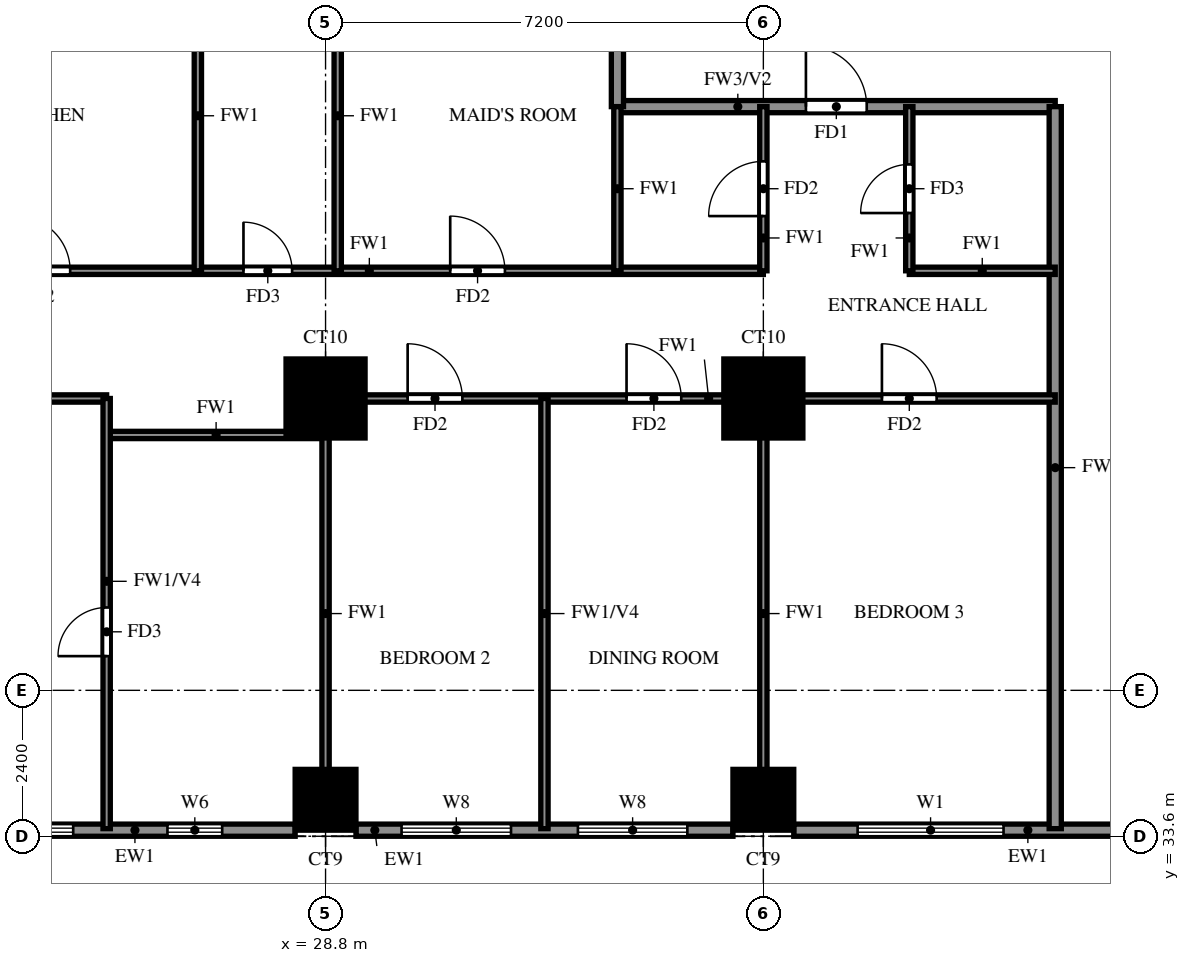
"""IFC4 building model, lengths in metres.
Left out: names, types, materials, properties, quantities, classifications, styles, units other than length and angle.
Written with IfcOpenShell. Run it as: python <this file> out.ifc"""

import sys

from ifc_helpers import new_model, si_unit, direction, frame, frame_2d, origin, origin_2d, place, context, subcontext, project, spatial, rectangle, extrude, source, transform, mapped, element, fill, save


model = new_model("IFC4")
c1 = context("Model", 3, precision=1e-05, world=origin(), true_north=direction((0.0, 1.0)))
c2 = subcontext(c1, "Body", "Model", "MODEL_VIEW")
j1 = project(units=[si_unit("LENGTHUNIT", "METRE"), si_unit("PLANEANGLEUNIT", "RADIAN")], contexts=[c1])
p1 = place(None, origin())
s1 = spatial("IfcSite", under=j1, at=p1, CompositionType="ELEMENT")
p2 = place(p1, origin())
s2 = spatial("IfcBuilding", under=s1, at=p2, CompositionType="ELEMENT")
p3 = place(p2, frame((0.0, 0.0, 90.0)))
s3 = spatial("IfcBuildingStorey", under=s2, at=p3, CompositionType="ELEMENT", Elevation=90.0)
m1 = source(origin(), c2, "Body", "SweptSolid", [
    extrude(rectangle(XDim=1.0, YDim=1.0, at=origin_2d()), origin(), (0.0, 0.0, 1.0), 3.18),
])
for number, where, z_axis, x_axis in (
    (1, (28.8, 34.2, 0.0), (0.0, 0.0, 1.0), (1.0, 0.0, 0.0)),
    (2, (36.0, 34.2, 0.0), (0.0, 0.0, 1.0), (1.0, 0.0, 0.0)),
):
    element("IfcColumn", number, at=place(p3, frame(where, z_axis=z_axis, x_axis=x_axis)), inside=s3, PredefinedType="COLUMN", context=c2, shape_type="MappedRepresentation", body=[
        mapped(m1, transform((0.0, 0.0, 0.0))),
    ])
m2 = source(origin(), c2, "Body", "SweptSolid", [
    extrude(rectangle(XDim=1.3, YDim=1.3, at=origin_2d()), origin(), (0.0, 0.0, 1.0), 3.18),
])
for number, where, z_axis, x_axis in (
    (3, (28.8, 40.8, 0.0), (0.0, 0.0, 1.0), (1.0, 0.0, 0.0)),
    (4, (36.0, 40.8, 0.0), (0.0, 0.0, 1.0), (1.0, 0.0, 0.0)),
):
    element("IfcColumn", number, at=place(p3, frame(where, z_axis=z_axis, x_axis=x_axis)), inside=s3, PredefinedType="COLUMN", context=c2, shape_type="MappedRepresentation", body=[
        mapped(m2, transform((0.0, 0.0, 0.0))),
    ])
p4 = place(p3, frame((22.1, 33.7, 0.0), z_axis=(0.0, 0.0, 1.0), x_axis=(1.0, 0.0, 0.0)))
e5 = element("IfcWall", 5, at=p4, inside=s3, PredefinedType="SOLIDWALL", context=c2, shape_type="SweptSolid", body=[
    extrude(rectangle(XDim=6.2, YDim=0.2, at=frame_2d((3.1, 0.0))), origin(), (0.0, 0.0, 1.0), 3.18),
])
p5 = place(p4, frame((0.75, 0.0, 0.6)))
e6 = element("IfcOpeningElement", 6, at=p5, cuts=e5, PredefinedType="OPENING", context=c2, shape_type="SweptSolid", body=[
    extrude(rectangle(XDim=1.8, YDim=2.4, at=frame_2d((0.9, 1.2))), frame((0.0, 0.11, 0.0), z_axis=(0.0, -1.0, 0.0), x_axis=(1.0, 0.0, 0.0)), (0.0, 0.0, 1.0), 0.22),
])
p6 = place(p4, frame((4.1, 0.0, 1.5)))
e7 = element("IfcOpeningElement", 7, at=p6, cuts=e5, PredefinedType="OPENING", context=c2, shape_type="SweptSolid", body=[
    extrude(rectangle(XDim=0.9, YDim=0.9, at=frame_2d((0.45, 0.45))), frame((0.0, 0.11, 0.0), z_axis=(0.0, -1.0, 0.0), x_axis=(1.0, 0.0, 0.0)), (0.0, 0.0, 1.0), 0.22),
])
p7 = place(p3, frame((29.3, 33.7, 0.0), z_axis=(0.0, 0.0, 1.0), x_axis=(1.0, 0.0, 0.0)))
e8 = element("IfcWall", 8, at=p7, inside=s3, PredefinedType="SOLIDWALL", context=c2, shape_type="SweptSolid", body=[
    extrude(rectangle(XDim=6.2, YDim=0.2, at=frame_2d((3.1, 0.0))), origin(), (0.0, 0.0, 1.0), 3.18),
])
p8 = place(p7, frame((0.75, 0.0, 0.6)))
e9 = element("IfcOpeningElement", 9, at=p8, cuts=e8, PredefinedType="OPENING", context=c2, shape_type="SweptSolid", body=[
    extrude(rectangle(XDim=1.8, YDim=2.4, at=frame_2d((0.9, 1.2))), frame((0.0, 0.11, 0.0), z_axis=(0.0, -1.0, 0.0), x_axis=(1.0, 0.0, 0.0)), (0.0, 0.0, 1.0), 0.22),
])
p9 = place(p7, frame((3.65, 0.0, 0.6)))
e10 = element("IfcOpeningElement", 10, at=p9, cuts=e8, PredefinedType="OPENING", context=c2, shape_type="SweptSolid", body=[
    extrude(rectangle(XDim=1.8, YDim=2.4, at=frame_2d((0.9, 1.2))), frame((0.0, 0.11, 0.0), z_axis=(0.0, -1.0, 0.0), x_axis=(1.0, 0.0, 0.0)), (0.0, 0.0, 1.0), 0.22),
])
p10 = place(p3, frame((36.5, 33.7, 0.0), z_axis=(0.0, 0.0, 1.0), x_axis=(1.0, 0.0, 0.0)))
e11 = element("IfcWall", 11, at=p10, inside=s3, PredefinedType="SOLIDWALL", context=c2, shape_type="SweptSolid", body=[
    extrude(rectangle(XDim=5.5, YDim=0.2, at=frame_2d((2.75, 0.0))), origin(), (0.0, 0.0, 1.0), 3.18),
])
p11 = place(p10, frame((1.05, 0.0, 0.6)))
e12 = element("IfcOpeningElement", 12, at=p11, cuts=e11, PredefinedType="OPENING", context=c2, shape_type="SweptSolid", body=[
    extrude(rectangle(XDim=2.4, YDim=2.4, at=frame_2d((1.2, 1.2))), frame((0.0, 0.11, 0.0), z_axis=(0.0, -1.0, 0.0), x_axis=(1.0, 0.0, 0.0)), (0.0, 0.0, 1.0), 0.22),
])
p12 = place(p3, frame((33.6, 45.6, 0.0), z_axis=(0.0, 0.0, 1.0), x_axis=(1.0, 0.0, 0.0)))
e13 = element("IfcWall", 13, at=p12, inside=s3, PredefinedType="SOLIDWALL", context=c2, shape_type="SweptSolid", body=[
    extrude(rectangle(XDim=7.2, YDim=0.2, at=frame_2d((3.6, 0.0))), origin(), (0.0, 0.0, 1.0), 3.18),
])
p13 = place(p12, frame((3.1, 0.0, 0.0)))
e14 = element("IfcOpeningElement", 14, at=p13, cuts=e13, PredefinedType="OPENING", context=c2, shape_type="SweptSolid", body=[
    extrude(rectangle(XDim=1.0, YDim=2.1, at=frame_2d((0.5, 1.05))), frame((0.0, 0.11, 0.0), z_axis=(0.0, -1.0, 0.0), x_axis=(1.0, 0.0, 0.0)), (0.0, 0.0, 1.0), 0.22),
])
p14 = place(p3, frame((33.6, 45.6, 0.0), z_axis=(0.0, 0.0, 1.0), x_axis=(0.0, 1.0, 0.0)))
e15 = element("IfcWall", 15, at=p14, inside=s3, PredefinedType="SOLIDWALL", context=c2, shape_type="SweptSolid", body=[
    extrude(rectangle(XDim=12.0, YDim=0.2, at=frame_2d((6.0, 0.0))), origin(), (0.0, 0.0, 1.0), 3.18),
])
p15 = place(p3, frame((40.8, 33.725, 0.0), z_axis=(0.0, 0.0, 1.0), x_axis=(0.0, 1.0, 0.0)))
e16 = element("IfcWall", 16, at=p15, inside=s3, PredefinedType="SOLIDWALL", context=c2, shape_type="SweptSolid", body=[
    extrude(rectangle(XDim=11.875, YDim=0.2, at=frame_2d((5.938, 0.0))), origin(), (0.0, 0.0, 1.0), 2.28),
])
p16 = place(p3, frame((25.2, 40.2, 0.0), z_axis=(0.0, 0.0, 1.0), x_axis=(1.0, 0.0, 0.0)))
e17 = element("IfcWall", 17, at=p16, inside=s3, PredefinedType="PARTITIONING", context=c2, shape_type="SweptSolid", body=[
    extrude(rectangle(XDim=3.6, YDim=0.12, at=frame_2d((1.8, 0.0))), origin(), (0.0, 0.0, 1.0), 3.18),
])
p17 = place(p3, frame((21.6, 40.8, 0.0), z_axis=(0.0, 0.0, 1.0), x_axis=(1.0, 0.0, 0.0)))
e18 = element("IfcWall", 18, at=p17, inside=s3, PredefinedType="PARTITIONING", context=c2, shape_type="SweptSolid", body=[
    extrude(rectangle(XDim=3.6, YDim=0.12, at=frame_2d((1.8, 0.0))), origin(), (0.0, 0.0, 1.0), 3.18),
])
p18 = place(p17, frame((1.35, 0.0, 0.0)))
e19 = element("IfcOpeningElement", 19, at=p18, cuts=e18, PredefinedType="OPENING", context=c2, shape_type="SweptSolid", body=[
    extrude(rectangle(XDim=0.9, YDim=2.1, at=frame_2d((0.45, 1.05))), frame((0.0, 0.07, 0.0), z_axis=(0.0, -1.0, 0.0), x_axis=(1.0, 0.0, 0.0)), (0.0, 0.0, 1.0), 0.14),
])
p19 = place(p3, frame((28.8, 40.8, 0.0), z_axis=(0.0, 0.0, 1.0), x_axis=(1.0, 0.0, 0.0)))
e20 = element("IfcWall", 20, at=p19, inside=s3, PredefinedType="PARTITIONING", context=c2, shape_type="SweptSolid", body=[
    extrude(rectangle(XDim=12.0, YDim=0.12, at=frame_2d((6.0, 0.0))), origin(), (0.0, 0.0, 1.0), 3.18),
])
p20 = place(p19, frame((1.35, 0.0, 0.0)))
e21 = element("IfcOpeningElement", 21, at=p20, cuts=e20, PredefinedType="OPENING", context=c2, shape_type="SweptSolid", body=[
    extrude(rectangle(XDim=0.9, YDim=2.1, at=frame_2d((0.45, 1.05))), frame((0.0, 0.07, 0.0), z_axis=(0.0, -1.0, 0.0), x_axis=(1.0, 0.0, 0.0)), (0.0, 0.0, 1.0), 0.14),
])
p21 = place(p19, frame((4.95, 0.0, 0.0)))
e22 = element("IfcOpeningElement", 22, at=p21, cuts=e20, PredefinedType="OPENING", context=c2, shape_type="SweptSolid", body=[
    extrude(rectangle(XDim=0.9, YDim=2.1, at=frame_2d((0.45, 1.05))), frame((0.0, 0.07, 0.0), z_axis=(0.0, -1.0, 0.0), x_axis=(1.0, 0.0, 0.0)), (0.0, 0.0, 1.0), 0.14),
])
p22 = place(p19, frame((9.15, 0.0, 0.0)))
e23 = element("IfcOpeningElement", 23, at=p22, cuts=e20, PredefinedType="OPENING", context=c2, shape_type="SweptSolid", body=[
    extrude(rectangle(XDim=0.9, YDim=2.1, at=frame_2d((0.45, 1.05))), frame((0.0, 0.07, 0.0), z_axis=(0.0, -1.0, 0.0), x_axis=(1.0, 0.0, 0.0)), (0.0, 0.0, 1.0), 0.14),
])
p23 = place(p3, frame((21.6, 42.9, 0.0), z_axis=(0.0, 0.0, 1.0), x_axis=(1.0, 0.0, 0.0)))
e24 = element("IfcWall", 24, at=p23, inside=s3, PredefinedType="PARTITIONING", context=c2, shape_type="SweptSolid", body=[
    extrude(rectangle(XDim=14.4, YDim=0.12, at=frame_2d((7.2, 0.0))), origin(), (0.0, 0.0, 1.0), 3.18),
])
p24 = place(p23, frame((2.1, 0.0, 0.0)))
e25 = element("IfcOpeningElement", 25, at=p24, cuts=e24, PredefinedType="OPENING", context=c2, shape_type="SweptSolid", body=[
    extrude(rectangle(XDim=0.9, YDim=2.1, at=frame_2d((0.45, 1.05))), frame((0.0, 0.07, 0.0), z_axis=(0.0, -1.0, 0.0), x_axis=(1.0, 0.0, 0.0)), (0.0, 0.0, 1.0), 0.14),
])
p25 = place(p23, frame((5.85, 0.0, 0.0)))
e26 = element("IfcOpeningElement", 26, at=p25, cuts=e24, PredefinedType="OPENING", context=c2, shape_type="SweptSolid", body=[
    extrude(rectangle(XDim=0.8, YDim=2.1, at=frame_2d((0.4, 1.05))), frame((0.0, 0.07, 0.0), z_axis=(0.0, -1.0, 0.0), x_axis=(1.0, 0.0, 0.0)), (0.0, 0.0, 1.0), 0.14),
])
p26 = place(p23, frame((9.25, 0.0, 0.0)))
e27 = element("IfcOpeningElement", 27, at=p26, cuts=e24, PredefinedType="OPENING", context=c2, shape_type="SweptSolid", body=[
    extrude(rectangle(XDim=0.9, YDim=2.1, at=frame_2d((0.45, 1.05))), frame((0.0, 0.07, 0.0), z_axis=(0.0, -1.0, 0.0), x_axis=(1.0, 0.0, 0.0)), (0.0, 0.0, 1.0), 0.14),
])
p27 = place(p3, frame((38.4, 42.9, 0.0), z_axis=(0.0, 0.0, 1.0), x_axis=(1.0, 0.0, 0.0)))
e28 = element("IfcWall", 28, at=p27, inside=s3, PredefinedType="PARTITIONING", context=c2, shape_type="SweptSolid", body=[
    extrude(rectangle(XDim=2.4, YDim=0.12, at=frame_2d((1.2, 0.0))), origin(), (0.0, 0.0, 1.0), 3.18),
])
p28 = place(p3, frame((25.2, 33.725, 0.0), z_axis=(0.0, 0.0, 1.0), x_axis=(0.0, 1.0, 0.0)))
e29 = element("IfcWall", 29, at=p28, inside=s3, PredefinedType="PARTITIONING", context=c2, shape_type="SweptSolid", body=[
    extrude(rectangle(XDim=7.075, YDim=0.12, at=frame_2d((3.538, 0.0))), origin(), (0.0, 0.0, 1.0), 2.28),
])
p29 = place(p28, frame((2.837, 0.0, 0.0)))
e30 = element("IfcOpeningElement", 30, at=p29, cuts=e29, PredefinedType="OPENING", context=c2, shape_type="SweptSolid", body=[
    extrude(rectangle(XDim=0.8, YDim=2.1, at=frame_2d((0.4, 1.05))), frame((0.0, 0.07, 0.0), z_axis=(0.0, -1.0, 0.0), x_axis=(1.0, 0.0, 0.0)), (0.0, 0.0, 1.0), 0.14),
])
p30 = place(p3, frame((26.7, 42.9, 0.0), z_axis=(0.0, 0.0, 1.0), x_axis=(0.0, 1.0, 0.0)))
e31 = element("IfcWall", 31, at=p30, inside=s3, PredefinedType="PARTITIONING", context=c2, shape_type="SweptSolid", body=[
    extrude(rectangle(XDim=5.1, YDim=0.12, at=frame_2d((2.55, 0.0))), origin(), (0.0, 0.0, 1.0), 3.18),
])
p31 = place(p3, frame((28.8, 33.725, 0.0), z_axis=(0.0, 0.0, 1.0), x_axis=(0.0, 1.0, 0.0)))
e32 = element("IfcWall", 32, at=p31, inside=s3, PredefinedType="PARTITIONING", context=c2, shape_type="SweptSolid", body=[
    extrude(rectangle(XDim=7.075, YDim=0.12, at=frame_2d((3.538, 0.0))), origin(), (0.0, 0.0, 1.0), 3.18),
])
p32 = place(p3, frame((29.0, 42.9, 0.0), z_axis=(0.0, 0.0, 1.0), x_axis=(0.0, 1.0, 0.0)))
e33 = element("IfcWall", 33, at=p32, inside=s3, PredefinedType="PARTITIONING", context=c2, shape_type="SweptSolid", body=[
    extrude(rectangle(XDim=5.1, YDim=0.12, at=frame_2d((2.55, 0.0))), origin(), (0.0, 0.0, 1.0), 3.18),
])
p33 = place(p3, frame((32.4, 33.725, 0.0), z_axis=(0.0, 0.0, 1.0), x_axis=(0.0, 1.0, 0.0)))
e34 = element("IfcWall", 34, at=p33, inside=s3, PredefinedType="PARTITIONING", context=c2, shape_type="SweptSolid", body=[
    extrude(rectangle(XDim=7.075, YDim=0.12, at=frame_2d((3.538, 0.0))), origin(), (0.0, 0.0, 1.0), 2.28),
])
p34 = place(p3, frame((33.6, 42.9, 0.0), z_axis=(0.0, 0.0, 1.0), x_axis=(0.0, 1.0, 0.0)))
e35 = element("IfcWall", 35, at=p34, inside=s3, PredefinedType="PARTITIONING", context=c2, shape_type="SweptSolid", body=[
    extrude(rectangle(XDim=2.7, YDim=0.12, at=frame_2d((1.35, 0.0))), origin(), (0.0, 0.0, 1.0), 3.18),
])
p35 = place(p3, frame((36.0, 33.725, 0.0), z_axis=(0.0, 0.0, 1.0), x_axis=(0.0, 1.0, 0.0)))
e36 = element("IfcWall", 36, at=p35, inside=s3, PredefinedType="PARTITIONING", context=c2, shape_type="SweptSolid", body=[
    extrude(rectangle(XDim=7.075, YDim=0.12, at=frame_2d((3.538, 0.0))), origin(), (0.0, 0.0, 1.0), 3.18),
])
p36 = place(p3, frame((36.0, 42.9, 0.0), z_axis=(0.0, 0.0, 1.0), x_axis=(0.0, 1.0, 0.0)))
e37 = element("IfcWall", 37, at=p36, inside=s3, PredefinedType="PARTITIONING", context=c2, shape_type="SweptSolid", body=[
    extrude(rectangle(XDim=2.7, YDim=0.12, at=frame_2d((1.35, 0.0))), origin(), (0.0, 0.0, 1.0), 3.18),
])
p37 = place(p36, frame((0.9, 0.0, 0.0)))
e38 = element("IfcOpeningElement", 38, at=p37, cuts=e37, PredefinedType="OPENING", context=c2, shape_type="SweptSolid", body=[
    extrude(rectangle(XDim=0.9, YDim=2.1, at=frame_2d((0.45, 1.05))), frame((0.0, 0.07, 0.0), z_axis=(0.0, -1.0, 0.0), x_axis=(1.0, 0.0, 0.0)), (0.0, 0.0, 1.0), 0.14),
])
p38 = place(p3, frame((38.4, 42.9, 0.0), z_axis=(0.0, 0.0, 1.0), x_axis=(0.0, 1.0, 0.0)))
e39 = element("IfcWall", 39, at=p38, inside=s3, PredefinedType="PARTITIONING", context=c2, shape_type="SweptSolid", body=[
    extrude(rectangle(XDim=2.7, YDim=0.12, at=frame_2d((1.35, 0.0))), origin(), (0.0, 0.0, 1.0), 3.18),
])
p39 = place(p38, frame((0.95, 0.0, 0.0)))
e40 = element("IfcOpeningElement", 40, at=p39, cuts=e39, PredefinedType="OPENING", context=c2, shape_type="SweptSolid", body=[
    extrude(rectangle(XDim=0.8, YDim=2.1, at=frame_2d((0.4, 1.05))), frame((0.0, 0.07, 0.0), z_axis=(0.0, -1.0, 0.0), x_axis=(1.0, 0.0, 0.0)), (0.0, 0.0, 1.0), 0.14),
])
p40 = place(p5, origin())
e41 = element("IfcWindow", 41, at=p40, inside=s3, PartitioningType="DOUBLE_PANEL_VERTICAL", PredefinedType="WINDOW", context=c2, shape_type="SweptSolid", body=[
    extrude(rectangle(XDim=1.8, YDim=2.4, at=frame_2d((0.9, 1.2))), frame((0.0, 0.03, 0.0), z_axis=(0.0, -1.0, 0.0), x_axis=(1.0, 0.0, 0.0)), (0.0, 0.0, 1.0), 0.06),
])
fill(e6, e41)
p41 = place(p6, origin())
e42 = element("IfcWindow", 42, at=p41, inside=s3, PartitioningType="SINGLE_PANEL", PredefinedType="WINDOW", context=c2, shape_type="SweptSolid", body=[
    extrude(rectangle(XDim=0.9, YDim=0.9, at=frame_2d((0.45, 0.45))), frame((0.0, 0.03, 0.0), z_axis=(0.0, -1.0, 0.0), x_axis=(1.0, 0.0, 0.0)), (0.0, 0.0, 1.0), 0.06),
])
fill(e7, e42)
p42 = place(p8, origin())
e43 = element("IfcWindow", 43, at=p42, inside=s3, PartitioningType="DOUBLE_PANEL_VERTICAL", PredefinedType="WINDOW", context=c2, shape_type="SweptSolid", body=[
    extrude(rectangle(XDim=1.8, YDim=2.4, at=frame_2d((0.9, 1.2))), frame((0.0, 0.03, 0.0), z_axis=(0.0, -1.0, 0.0), x_axis=(1.0, 0.0, 0.0)), (0.0, 0.0, 1.0), 0.06),
])
fill(e9, e43)
p43 = place(p9, origin())
e44 = element("IfcWindow", 44, at=p43, inside=s3, PartitioningType="DOUBLE_PANEL_VERTICAL", PredefinedType="WINDOW", context=c2, shape_type="SweptSolid", body=[
    extrude(rectangle(XDim=1.8, YDim=2.4, at=frame_2d((0.9, 1.2))), frame((0.0, 0.03, 0.0), z_axis=(0.0, -1.0, 0.0), x_axis=(1.0, 0.0, 0.0)), (0.0, 0.0, 1.0), 0.06),
])
fill(e10, e44)
p44 = place(p11, origin())
e45 = element("IfcWindow", 45, at=p44, inside=s3, PartitioningType="DOUBLE_PANEL_VERTICAL", PredefinedType="WINDOW", context=c2, shape_type="SweptSolid", body=[
    extrude(rectangle(XDim=2.4, YDim=2.4, at=frame_2d((1.2, 1.2))), frame((0.0, 0.03, 0.0), z_axis=(0.0, -1.0, 0.0), x_axis=(1.0, 0.0, 0.0)), (0.0, 0.0, 1.0), 0.06),
])
fill(e12, e45)
p45 = place(p13, origin())
e46 = element("IfcDoor", 46, at=p45, inside=s3, OperationType="SINGLE_SWING_LEFT", PredefinedType="DOOR", context=c2, shape_type="SweptSolid", body=[
    extrude(rectangle(XDim=1.0, YDim=2.1, at=frame_2d((0.5, 1.05))), frame((0.0, 0.025, 0.0), z_axis=(0.0, -1.0, 0.0), x_axis=(1.0, 0.0, 0.0)), (0.0, 0.0, 1.0), 0.05),
])
fill(e14, e46)
p46 = place(p29, origin())
e47 = element("IfcDoor", 47, at=p46, inside=s3, OperationType="SINGLE_SWING_LEFT", PredefinedType="DOOR", context=c2, shape_type="SweptSolid", body=[
    extrude(rectangle(XDim=0.8, YDim=2.1, at=frame_2d((0.4, 1.05))), frame((0.0, 0.025, 0.0), z_axis=(0.0, -1.0, 0.0), x_axis=(1.0, 0.0, 0.0)), (0.0, 0.0, 1.0), 0.05),
])
fill(e30, e47)
p47 = place(p20, origin())
e48 = element("IfcDoor", 48, at=p47, inside=s3, OperationType="SINGLE_SWING_RIGHT", PredefinedType="DOOR", context=c2, shape_type="SweptSolid", body=[
    extrude(rectangle(XDim=0.9, YDim=2.1, at=frame_2d((0.45, 1.05))), frame((0.0, 0.025, 0.0), z_axis=(0.0, -1.0, 0.0), x_axis=(1.0, 0.0, 0.0)), (0.0, 0.0, 1.0), 0.05),
])
fill(e21, e48)
p48 = place(p21, origin())
e49 = element("IfcDoor", 49, at=p48, inside=s3, OperationType="SINGLE_SWING_LEFT", PredefinedType="DOOR", context=c2, shape_type="SweptSolid", body=[
    extrude(rectangle(XDim=0.9, YDim=2.1, at=frame_2d((0.45, 1.05))), frame((0.0, 0.025, 0.0), z_axis=(0.0, -1.0, 0.0), x_axis=(1.0, 0.0, 0.0)), (0.0, 0.0, 1.0), 0.05),
])
fill(e22, e49)
p49 = place(p22, origin())
e50 = element("IfcDoor", 50, at=p49, inside=s3, OperationType="SINGLE_SWING_LEFT", PredefinedType="DOOR", context=c2, shape_type="SweptSolid", body=[
    extrude(rectangle(XDim=0.9, YDim=2.1, at=frame_2d((0.45, 1.05))), frame((0.0, 0.025, 0.0), z_axis=(0.0, -1.0, 0.0), x_axis=(1.0, 0.0, 0.0)), (0.0, 0.0, 1.0), 0.05),
])
fill(e23, e50)
p50 = place(p24, origin())
e51 = element("IfcDoor", 51, at=p50, inside=s3, OperationType="SINGLE_SWING_RIGHT", PredefinedType="DOOR", context=c2, shape_type="SweptSolid", body=[
    extrude(rectangle(XDim=0.9, YDim=2.1, at=frame_2d((0.45, 1.05))), frame((0.0, 0.025, 0.0), z_axis=(0.0, -1.0, 0.0), x_axis=(1.0, 0.0, 0.0)), (0.0, 0.0, 1.0), 0.05),
])
fill(e25, e51)
p51 = place(p25, origin())
e52 = element("IfcDoor", 52, at=p51, inside=s3, OperationType="SINGLE_SWING_LEFT", PredefinedType="DOOR", context=c2, shape_type="SweptSolid", body=[
    extrude(rectangle(XDim=0.8, YDim=2.1, at=frame_2d((0.4, 1.05))), frame((0.0, 0.025, 0.0), z_axis=(0.0, -1.0, 0.0), x_axis=(1.0, 0.0, 0.0)), (0.0, 0.0, 1.0), 0.05),
])
fill(e26, e52)
p52 = place(p26, origin())
e53 = element("IfcDoor", 53, at=p52, inside=s3, OperationType="SINGLE_SWING_LEFT", PredefinedType="DOOR", context=c2, shape_type="SweptSolid", body=[
    extrude(rectangle(XDim=0.9, YDim=2.1, at=frame_2d((0.45, 1.05))), frame((0.0, 0.025, 0.0), z_axis=(0.0, -1.0, 0.0), x_axis=(1.0, 0.0, 0.0)), (0.0, 0.0, 1.0), 0.05),
])
fill(e27, e53)
p53 = place(p37, origin())
e54 = element("IfcDoor", 54, at=p53, inside=s3, OperationType="SINGLE_SWING_RIGHT", PredefinedType="DOOR", context=c2, shape_type="SweptSolid", body=[
    extrude(rectangle(XDim=0.9, YDim=2.1, at=frame_2d((0.45, 1.05))), frame((0.0, 0.025, 0.0), z_axis=(0.0, -1.0, 0.0), x_axis=(1.0, 0.0, 0.0)), (0.0, 0.0, 1.0), 0.05),
])
fill(e38, e54)
p54 = place(p39, origin())
e55 = element("IfcDoor", 55, at=p54, inside=s3, OperationType="SINGLE_SWING_LEFT", PredefinedType="DOOR", context=c2, shape_type="SweptSolid", body=[
    extrude(rectangle(XDim=0.8, YDim=2.1, at=frame_2d((0.4, 1.05))), frame((0.0, 0.025, 0.0), z_axis=(0.0, -1.0, 0.0), x_axis=(1.0, 0.0, 0.0)), (0.0, 0.0, 1.0), 0.05),
])
fill(e40, e55)
save(model, sys.argv[1])
